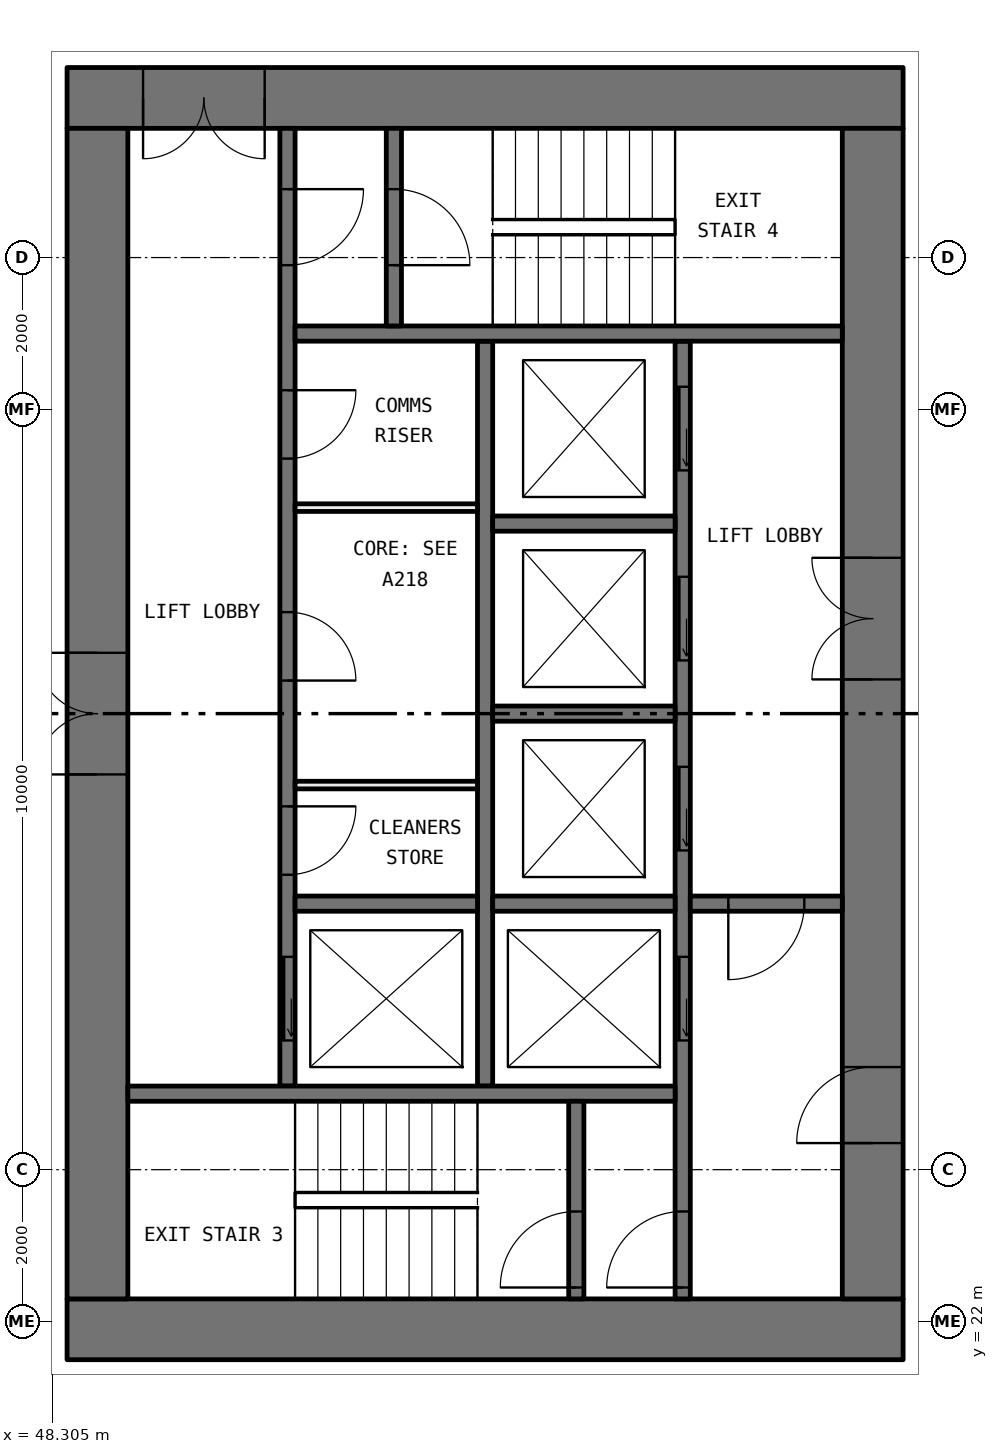
"""IFC4 building model, lengths in metres.
Left out: names, types, materials, properties, quantities, classifications, styles, units other than length and angle.
Written with IfcOpenShell. Run it as: python <this file> out.ifc"""

import sys

from ifc_helpers import new_model, si_unit, direction, frame, frame_2d, origin, place, context, subcontext, project, spatial, rectangle, extrude, element, fill, save


model = new_model("IFC4")
c1 = context("Model", 3, precision=1e-05, world=origin(), true_north=direction((0.0, 1.0)))
c2 = subcontext(c1, "Body", "Model", "MODEL_VIEW")
j1 = project(units=[si_unit("LENGTHUNIT", "METRE"), si_unit("PLANEANGLEUNIT", "RADIAN")], contexts=[c1])
p1 = place(None, origin())
s1 = spatial("IfcSite", under=j1, at=p1, CompositionType="ELEMENT")
p2 = place(p1, origin())
s2 = spatial("IfcBuilding", under=s1, at=p2, CompositionType="ELEMENT")
p3 = place(p2, frame((0.0, 0.0, 71.4)))
s3 = spatial("IfcBuildingStorey", under=s2, at=p3, CompositionType="ELEMENT", Elevation=71.4)
p4 = place(p3, frame((59.5, 21.9, 0.0), z_axis=(0.0, 0.0, 1.0), x_axis=(-1.0, 0.0, 0.0)))
e1 = element("IfcWall", 1, at=p4, inside=s3, PredefinedType="SHEAR", context=c2, shape_type="SweptSolid", body=[
    extrude(rectangle(XDim=11.0, YDim=0.8, at=frame_2d((5.5, 0.0))), origin(), (0.0, 0.0, 1.0), 3.05),
])
p5 = place(p3, frame((59.5, 38.1, 0.0), z_axis=(0.0, 0.0, 1.0), x_axis=(-1.0, 0.0, 0.0)))
e2 = element("IfcWall", 2, at=p5, inside=s3, PredefinedType="SHEAR", context=c2, shape_type="SweptSolid", body=[
    extrude(rectangle(XDim=11.0, YDim=0.8, at=frame_2d((5.5, 0.0))), origin(), (0.0, 0.0, 1.0), 3.05),
])
p6 = place(p5, frame((8.4, 0.0, 0.0)))
e3 = element("IfcOpeningElement", 3, at=p6, cuts=e2, PredefinedType="OPENING", context=c2, shape_type="SweptSolid", body=[
    extrude(rectangle(XDim=1.6, YDim=2.1, at=frame_2d((0.8, 1.05))), frame((0.0, 0.41, 0.0), z_axis=(0.0, -1.0, 0.0), x_axis=(1.0, 0.0, 0.0)), (0.0, 0.0, 1.0), 0.82),
])
p7 = place(p3, frame((59.1, 22.3, 0.0), z_axis=(0.0, 0.0, 1.0), x_axis=(0.0, 1.0, 0.0)))
e4 = element("IfcWall", 4, at=p7, inside=s3, PredefinedType="SHEAR", context=c2, shape_type="SweptSolid", body=[
    extrude(rectangle(XDim=15.4, YDim=0.8, at=frame_2d((7.7, 0.0))), origin(), (0.0, 0.0, 1.0), 3.05),
])
p8 = place(p7, frame((8.15, 0.0, 0.0)))
e5 = element("IfcOpeningElement", 5, at=p8, cuts=e4, PredefinedType="OPENING", context=c2, shape_type="SweptSolid", body=[
    extrude(rectangle(XDim=1.6, YDim=2.1, at=frame_2d((0.8, 1.05))), frame((0.0, 0.41, 0.0), z_axis=(0.0, -1.0, 0.0), x_axis=(1.0, 0.0, 0.0)), (0.0, 0.0, 1.0), 0.82),
])
p9 = place(p7, frame((2.05, 0.0, 0.0)))
e6 = element("IfcOpeningElement", 6, at=p9, cuts=e4, PredefinedType="OPENING", context=c2, shape_type="SweptSolid", body=[
    extrude(rectangle(XDim=1.0, YDim=2.1, at=frame_2d((0.5, 1.05))), frame((0.0, 0.41, 0.0), z_axis=(0.0, -1.0, 0.0), x_axis=(1.0, 0.0, 0.0)), (0.0, 0.0, 1.0), 0.82),
])
p10 = place(p3, frame((48.9, 22.3, 0.0), z_axis=(0.0, 0.0, 1.0), x_axis=(0.0, 1.0, 0.0)))
e7 = element("IfcWall", 7, at=p10, inside=s3, PredefinedType="SHEAR", context=c2, shape_type="SweptSolid", body=[
    extrude(rectangle(XDim=15.4, YDim=0.8, at=frame_2d((7.7, 0.0))), origin(), (0.0, 0.0, 1.0), 3.05),
])
p11 = place(p10, frame((6.9, 0.0, 0.0)))
e8 = element("IfcOpeningElement", 8, at=p11, cuts=e7, PredefinedType="OPENING", context=c2, shape_type="SweptSolid", body=[
    extrude(rectangle(XDim=1.6, YDim=2.1, at=frame_2d((0.8, 1.05))), frame((0.0, 0.41, 0.0), z_axis=(0.0, -1.0, 0.0), x_axis=(1.0, 0.0, 0.0)), (0.0, 0.0, 1.0), 0.82),
])
p12 = place(p3, frame((56.6, 22.3, 0.0), z_axis=(0.0, 0.0, 1.0), x_axis=(0.0, 1.0, 0.0)))
e9 = element("IfcWall", 9, at=p12, inside=s3, PredefinedType="SOLIDWALL", context=c2, shape_type="SweptSolid", body=[
    extrude(rectangle(XDim=12.6, YDim=0.2, at=frame_2d((6.3, 0.0))), origin(), (0.0, 0.0, 1.0), 3.05),
])
p13 = place(p12, frame((3.4, 0.0, 0.0)))
e10 = element("IfcOpeningElement", 10, at=p13, cuts=e9, PredefinedType="OPENING", context=c2, shape_type="SweptSolid", body=[
    extrude(rectangle(XDim=1.1, YDim=2.1, at=frame_2d((0.55, 1.05))), frame((0.0, 0.11, 0.0), z_axis=(0.0, -1.0, 0.0), x_axis=(1.0, 0.0, 0.0)), (0.0, 0.0, 1.0), 0.22),
])
p14 = place(p12, frame((5.9, 0.0, 0.0)))
e11 = element("IfcOpeningElement", 11, at=p14, cuts=e9, PredefinedType="OPENING", context=c2, shape_type="SweptSolid", body=[
    extrude(rectangle(XDim=1.1, YDim=2.1, at=frame_2d((0.55, 1.05))), frame((0.0, 0.11, 0.0), z_axis=(0.0, -1.0, 0.0), x_axis=(1.0, 0.0, 0.0)), (0.0, 0.0, 1.0), 0.22),
])
p15 = place(p12, frame((8.4, 0.0, 0.0)))
e12 = element("IfcOpeningElement", 12, at=p15, cuts=e9, PredefinedType="OPENING", context=c2, shape_type="SweptSolid", body=[
    extrude(rectangle(XDim=1.1, YDim=2.1, at=frame_2d((0.55, 1.05))), frame((0.0, 0.11, 0.0), z_axis=(0.0, -1.0, 0.0), x_axis=(1.0, 0.0, 0.0)), (0.0, 0.0, 1.0), 0.22),
])
p16 = place(p12, frame((10.9, 0.0, 0.0)))
e13 = element("IfcOpeningElement", 13, at=p16, cuts=e9, PredefinedType="OPENING", context=c2, shape_type="SweptSolid", body=[
    extrude(rectangle(XDim=1.1, YDim=2.1, at=frame_2d((0.55, 1.05))), frame((0.0, 0.11, 0.0), z_axis=(0.0, -1.0, 0.0), x_axis=(1.0, 0.0, 0.0)), (0.0, 0.0, 1.0), 0.22),
])
p17 = place(p12, frame((0.15, 0.0, 0.0)))
e14 = element("IfcOpeningElement", 14, at=p17, cuts=e9, PredefinedType="OPENING", context=c2, shape_type="SweptSolid", body=[
    extrude(rectangle(XDim=1.0, YDim=2.1, at=frame_2d((0.5, 1.05))), frame((0.0, 0.11, 0.0), z_axis=(0.0, -1.0, 0.0), x_axis=(1.0, 0.0, 0.0)), (0.0, 0.0, 1.0), 0.22),
])
p18 = place(p3, frame((51.4, 25.1, 0.0), z_axis=(0.0, 0.0, 1.0), x_axis=(0.0, 1.0, 0.0)))
e15 = element("IfcWall", 15, at=p18, inside=s3, PredefinedType="SOLIDWALL", context=c2, shape_type="SweptSolid", body=[
    extrude(rectangle(XDim=12.6, YDim=0.2, at=frame_2d((6.3, 0.0))), origin(), (0.0, 0.0, 1.0), 3.05),
])
p19 = place(p18, frame((0.6, 0.0, 0.0)))
e16 = element("IfcOpeningElement", 16, at=p19, cuts=e15, PredefinedType="OPENING", context=c2, shape_type="SweptSolid", body=[
    extrude(rectangle(XDim=1.1, YDim=2.1, at=frame_2d((0.55, 1.05))), frame((0.0, 0.11, 0.0), z_axis=(0.0, -1.0, 0.0), x_axis=(1.0, 0.0, 0.0)), (0.0, 0.0, 1.0), 0.22),
])
p20 = place(p18, frame((10.8, 0.0, 0.0)))
e17 = element("IfcOpeningElement", 17, at=p20, cuts=e15, PredefinedType="OPENING", context=c2, shape_type="SweptSolid", body=[
    extrude(rectangle(XDim=1.0, YDim=2.1, at=frame_2d((0.5, 1.05))), frame((0.0, 0.11, 0.0), z_axis=(0.0, -1.0, 0.0), x_axis=(1.0, 0.0, 0.0)), (0.0, 0.0, 1.0), 0.22),
])
p21 = place(p18, frame((2.78, 0.0, 0.0)))
e18 = element("IfcOpeningElement", 18, at=p21, cuts=e15, PredefinedType="OPENING", context=c2, shape_type="SweptSolid", body=[
    extrude(rectangle(XDim=0.9, YDim=2.1, at=frame_2d((0.45, 1.05))), frame((0.0, 0.11, 0.0), z_axis=(0.0, -1.0, 0.0), x_axis=(1.0, 0.0, 0.0)), (0.0, 0.0, 1.0), 0.22),
])
p22 = place(p18, frame((5.335, 0.0, 0.0)))
e19 = element("IfcOpeningElement", 19, at=p22, cuts=e15, PredefinedType="OPENING", context=c2, shape_type="SweptSolid", body=[
    extrude(rectangle(XDim=0.9, YDim=2.1, at=frame_2d((0.45, 1.05))), frame((0.0, 0.11, 0.0), z_axis=(0.0, -1.0, 0.0), x_axis=(1.0, 0.0, 0.0)), (0.0, 0.0, 1.0), 0.22),
])
p23 = place(p18, frame((8.255, 0.0, 0.0)))
e20 = element("IfcOpeningElement", 20, at=p23, cuts=e15, PredefinedType="OPENING", context=c2, shape_type="SweptSolid", body=[
    extrude(rectangle(XDim=0.9, YDim=2.1, at=frame_2d((0.45, 1.05))), frame((0.0, 0.11, 0.0), z_axis=(0.0, -1.0, 0.0), x_axis=(1.0, 0.0, 0.0)), (0.0, 0.0, 1.0), 0.22),
])
p24 = place(p3, frame((54.0, 25.1, 0.0), z_axis=(0.0, 0.0, 1.0), x_axis=(0.0, 1.0, 0.0)))
e21 = element("IfcWall", 21, at=p24, inside=s3, PredefinedType="SOLIDWALL", context=c2, shape_type="SweptSolid", body=[
    extrude(rectangle(XDim=9.8, YDim=0.2, at=frame_2d((4.9, 0.0))), origin(), (0.0, 0.0, 1.0), 3.05),
])
for number, where, z_axis, x_axis in (
    (22, (56.5, 25.0, 0.0), (0.0, 0.0, 1.0), (-1.0, 0.0, 0.0)),
    (23, (58.7, 35.0, 0.0), (0.0, 0.0, 1.0), (-1.0, 0.0, 0.0)),
):
    element("IfcWall", number, at=place(p3, frame(where, z_axis=z_axis, x_axis=x_axis)), inside=s3, PredefinedType="SOLIDWALL", context=c2, shape_type="SweptSolid", body=[
        extrude(rectangle(XDim=7.2, YDim=0.2, at=frame_2d((3.6, 0.0))), origin(), (0.0, 0.0, 1.0), 3.05),
    ])
p25 = place(p3, frame((58.7, 27.5, 0.0), z_axis=(0.0, 0.0, 1.0), x_axis=(-1.0, 0.0, 0.0)))
e24 = element("IfcWall", 24, at=p25, inside=s3, PredefinedType="SOLIDWALL", context=c2, shape_type="SweptSolid", body=[
    extrude(rectangle(XDim=2.0, YDim=0.2, at=frame_2d((1.0, 0.0))), origin(), (0.0, 0.0, 1.0), 3.05),
])
p26 = place(p25, frame((0.5, 0.0, 0.0)))
e25 = element("IfcOpeningElement", 25, at=p26, cuts=e24, PredefinedType="OPENING", context=c2, shape_type="SweptSolid", body=[
    extrude(rectangle(XDim=1.0, YDim=2.1, at=frame_2d((0.5, 1.05))), frame((0.0, 0.11, 0.0), z_axis=(0.0, -1.0, 0.0), x_axis=(1.0, 0.0, 0.0)), (0.0, 0.0, 1.0), 0.22),
])
p27 = place(p3, frame((55.2, 22.3, 0.0), z_axis=(0.0, 0.0, 1.0), x_axis=(0.0, 1.0, 0.0)))
e26 = element("IfcWall", 26, at=p27, inside=s3, PredefinedType="SOLIDWALL", context=c2, shape_type="SweptSolid", body=[
    extrude(rectangle(XDim=2.6, YDim=0.2, at=frame_2d((1.3, 0.0))), origin(), (0.0, 0.0, 1.0), 3.05),
])
p28 = place(p27, frame((0.15, 0.0, 0.0)))
e27 = element("IfcOpeningElement", 27, at=p28, cuts=e26, PredefinedType="OPENING", context=c2, shape_type="SweptSolid", body=[
    extrude(rectangle(XDim=1.0, YDim=2.1, at=frame_2d((0.5, 1.05))), frame((0.0, 0.11, 0.0), z_axis=(0.0, -1.0, 0.0), x_axis=(1.0, 0.0, 0.0)), (0.0, 0.0, 1.0), 0.22),
])
p29 = place(p3, frame((52.8, 35.1, 0.0), z_axis=(0.0, 0.0, 1.0), x_axis=(0.0, 1.0, 0.0)))
e28 = element("IfcWall", 28, at=p29, inside=s3, PredefinedType="SOLIDWALL", context=c2, shape_type="SweptSolid", body=[
    extrude(rectangle(XDim=2.6, YDim=0.2, at=frame_2d((1.3, 0.0))), origin(), (0.0, 0.0, 1.0), 3.05),
])
p30 = place(p29, frame((0.8, 0.0, 0.0)))
e29 = element("IfcOpeningElement", 29, at=p30, cuts=e28, PredefinedType="OPENING", context=c2, shape_type="SweptSolid", body=[
    extrude(rectangle(XDim=1.0, YDim=2.1, at=frame_2d((0.5, 1.05))), frame((0.0, 0.11, 0.0), z_axis=(0.0, -1.0, 0.0), x_axis=(1.0, 0.0, 0.0)), (0.0, 0.0, 1.0), 0.22),
])
for number, where, z_axis, x_axis in (
    (30, (56.5, 27.5, 0.0), (0.0, 0.0, 1.0), (-1.0, 0.0, 0.0)),
    (31, (56.5, 30.0, 0.0), (0.0, 0.0, 1.0), (-1.0, 0.0, 0.0)),
    (32, (56.5, 32.5, 0.0), (0.0, 0.0, 1.0), (-1.0, 0.0, 0.0)),
    (33, (53.9, 27.5, 0.0), (0.0, 0.0, 1.0), (-1.0, 0.0, 0.0)),
):
    element("IfcWall", number, at=place(p3, frame(where, z_axis=z_axis, x_axis=x_axis)), inside=s3, PredefinedType="SOLIDWALL", context=c2, shape_type="SweptSolid", body=[
        extrude(rectangle(XDim=2.4, YDim=0.2, at=frame_2d((1.2, 0.0))), origin(), (0.0, 0.0, 1.0), 3.05),
    ])
for number, where, z_axis, x_axis in (
    (34, (53.9, 29.06, 0.0), (0.0, 0.0, 1.0), (-1.0, 0.0, 0.0)),
    (35, (53.9, 32.71, 0.0), (0.0, 0.0, 1.0), (-1.0, 0.0, 0.0)),
):
    element("IfcWall", number, at=place(p3, frame(where, z_axis=z_axis, x_axis=x_axis)), inside=s3, PredefinedType="PARTITIONING", context=c2, shape_type="SweptSolid", body=[
        extrude(rectangle(XDim=2.4, YDim=0.1, at=frame_2d((1.2, 0.0))), origin(), (0.0, 0.0, 1.0), 3.05),
    ])
p31 = place(p19, origin())
e36 = element("IfcDoor", 36, at=p31, inside=s3, OperationType="SLIDING_TO_LEFT", PredefinedType="DOOR", context=c2, shape_type="SweptSolid", body=[
    extrude(rectangle(XDim=1.1, YDim=2.1, at=frame_2d((0.55, 1.05))), frame((0.0, 0.025, 0.0), z_axis=(0.0, -1.0, 0.0), x_axis=(1.0, 0.0, 0.0)), (0.0, 0.0, 1.0), 0.05),
])
fill(e16, e36)
p32 = place(p13, origin())
e37 = element("IfcDoor", 37, at=p32, inside=s3, OperationType="SLIDING_TO_LEFT", PredefinedType="DOOR", context=c2, shape_type="SweptSolid", body=[
    extrude(rectangle(XDim=1.1, YDim=2.1, at=frame_2d((0.55, 1.05))), frame((0.0, 0.025, 0.0), z_axis=(0.0, -1.0, 0.0), x_axis=(1.0, 0.0, 0.0)), (0.0, 0.0, 1.0), 0.05),
])
fill(e10, e37)
p33 = place(p14, origin())
e38 = element("IfcDoor", 38, at=p33, inside=s3, OperationType="SLIDING_TO_LEFT", PredefinedType="DOOR", context=c2, shape_type="SweptSolid", body=[
    extrude(rectangle(XDim=1.1, YDim=2.1, at=frame_2d((0.55, 1.05))), frame((0.0, 0.025, 0.0), z_axis=(0.0, -1.0, 0.0), x_axis=(1.0, 0.0, 0.0)), (0.0, 0.0, 1.0), 0.05),
])
fill(e11, e38)
p34 = place(p15, origin())
e39 = element("IfcDoor", 39, at=p34, inside=s3, OperationType="SLIDING_TO_LEFT", PredefinedType="DOOR", context=c2, shape_type="SweptSolid", body=[
    extrude(rectangle(XDim=1.1, YDim=2.1, at=frame_2d((0.55, 1.05))), frame((0.0, 0.025, 0.0), z_axis=(0.0, -1.0, 0.0), x_axis=(1.0, 0.0, 0.0)), (0.0, 0.0, 1.0), 0.05),
])
fill(e12, e39)
p35 = place(p16, origin())
e40 = element("IfcDoor", 40, at=p35, inside=s3, OperationType="SLIDING_TO_LEFT", PredefinedType="DOOR", context=c2, shape_type="SweptSolid", body=[
    extrude(rectangle(XDim=1.1, YDim=2.1, at=frame_2d((0.55, 1.05))), frame((0.0, 0.025, 0.0), z_axis=(0.0, -1.0, 0.0), x_axis=(1.0, 0.0, 0.0)), (0.0, 0.0, 1.0), 0.05),
])
fill(e13, e40)
p36 = place(p28, origin())
e41 = element("IfcDoor", 41, at=p36, inside=s3, OperationType="SINGLE_SWING_RIGHT", PredefinedType="DOOR", context=c2, shape_type="SweptSolid", body=[
    extrude(rectangle(XDim=1.0, YDim=2.1, at=frame_2d((0.5, 1.05))), frame((0.0, 0.025, 0.0), z_axis=(0.0, -1.0, 0.0), x_axis=(1.0, 0.0, 0.0)), (0.0, 0.0, 1.0), 0.05),
])
fill(e27, e41)
p37 = place(p17, origin())
e42 = element("IfcDoor", 42, at=p37, inside=s3, OperationType="SINGLE_SWING_RIGHT", PredefinedType="DOOR", context=c2, shape_type="SweptSolid", body=[
    extrude(rectangle(XDim=1.0, YDim=2.1, at=frame_2d((0.5, 1.05))), frame((0.0, 0.025, 0.0), z_axis=(0.0, -1.0, 0.0), x_axis=(1.0, 0.0, 0.0)), (0.0, 0.0, 1.0), 0.05),
])
fill(e14, e42)
p38 = place(p20, frame((1.0, 0.0, 0.0), x_axis=(-1.0, 0.0, 0.0)))
e43 = element("IfcDoor", 43, at=p38, inside=s3, OperationType="SINGLE_SWING_RIGHT", PredefinedType="DOOR", context=c2, shape_type="SweptSolid", body=[
    extrude(rectangle(XDim=1.0, YDim=2.1, at=frame_2d((0.5, 1.05))), frame((0.0, 0.025, 0.0), z_axis=(0.0, -1.0, 0.0), x_axis=(1.0, 0.0, 0.0)), (0.0, 0.0, 1.0), 0.05),
])
fill(e17, e43)
p39 = place(p30, frame((1.0, 0.0, 0.0), x_axis=(-1.0, 0.0, 0.0)))
e44 = element("IfcDoor", 44, at=p39, inside=s3, OperationType="SINGLE_SWING_LEFT", PredefinedType="DOOR", context=c2, shape_type="SweptSolid", body=[
    extrude(rectangle(XDim=1.0, YDim=2.1, at=frame_2d((0.5, 1.05))), frame((0.0, 0.025, 0.0), z_axis=(0.0, -1.0, 0.0), x_axis=(1.0, 0.0, 0.0)), (0.0, 0.0, 1.0), 0.05),
])
fill(e29, e44)
p40 = place(p26, origin())
e45 = element("IfcDoor", 45, at=p40, inside=s3, OperationType="SINGLE_SWING_LEFT", PredefinedType="DOOR", context=c2, shape_type="SweptSolid", body=[
    extrude(rectangle(XDim=1.0, YDim=2.1, at=frame_2d((0.5, 1.05))), frame((0.0, 0.025, 0.0), z_axis=(0.0, -1.0, 0.0), x_axis=(1.0, 0.0, 0.0)), (0.0, 0.0, 1.0), 0.05),
])
fill(e25, e45)
p41 = place(p8, origin())
e46 = element("IfcDoor", 46, at=p41, inside=s3, OperationType="DOUBLE_DOOR_SINGLE_SWING", PredefinedType="DOOR", context=c2, shape_type="SweptSolid", body=[
    extrude(rectangle(XDim=1.6, YDim=2.1, at=frame_2d((0.8, 1.05))), frame((0.0, 0.025, 0.0), z_axis=(0.0, -1.0, 0.0), x_axis=(1.0, 0.0, 0.0)), (0.0, 0.0, 1.0), 0.05),
])
fill(e5, e46)
p42 = place(p9, origin())
e47 = element("IfcDoor", 47, at=p42, inside=s3, OperationType="SINGLE_SWING_RIGHT", PredefinedType="DOOR", context=c2, shape_type="SweptSolid", body=[
    extrude(rectangle(XDim=1.0, YDim=2.1, at=frame_2d((0.5, 1.05))), frame((0.0, 0.025, 0.0), z_axis=(0.0, -1.0, 0.0), x_axis=(1.0, 0.0, 0.0)), (0.0, 0.0, 1.0), 0.05),
])
fill(e6, e47)
p43 = place(p6, origin())
e48 = element("IfcDoor", 48, at=p43, inside=s3, OperationType="DOUBLE_DOOR_SINGLE_SWING", PredefinedType="DOOR", context=c2, shape_type="SweptSolid", body=[
    extrude(rectangle(XDim=1.6, YDim=2.1, at=frame_2d((0.8, 1.05))), frame((0.0, 0.025, 0.0), z_axis=(0.0, -1.0, 0.0), x_axis=(1.0, 0.0, 0.0)), (0.0, 0.0, 1.0), 0.05),
])
fill(e3, e48)
p44 = place(p11, origin())
e49 = element("IfcDoor", 49, at=p44, inside=s3, OperationType="DOUBLE_DOOR_SINGLE_SWING", PredefinedType="DOOR", context=c2, shape_type="SweptSolid", body=[
    extrude(rectangle(XDim=1.6, YDim=2.1, at=frame_2d((0.8, 1.05))), frame((0.0, 0.025, 0.0), z_axis=(0.0, -1.0, 0.0), x_axis=(1.0, 0.0, 0.0)), (0.0, 0.0, 1.0), 0.05),
])
fill(e8, e49)
p45 = place(p21, frame((0.9, 0.0, 0.0), x_axis=(-1.0, 0.0, 0.0)))
e50 = element("IfcDoor", 50, at=p45, inside=s3, OperationType="SINGLE_SWING_RIGHT", PredefinedType="DOOR", context=c2, shape_type="SweptSolid", body=[
    extrude(rectangle(XDim=0.9, YDim=2.1, at=frame_2d((0.45, 1.05))), frame((0.0, 0.025, 0.0), z_axis=(0.0, -1.0, 0.0), x_axis=(1.0, 0.0, 0.0)), (0.0, 0.0, 1.0), 0.05),
])
fill(e18, e50)
p46 = place(p22, frame((0.9, 0.0, 0.0), x_axis=(-1.0, 0.0, 0.0)))
e51 = element("IfcDoor", 51, at=p46, inside=s3, OperationType="SINGLE_SWING_LEFT", PredefinedType="DOOR", context=c2, shape_type="SweptSolid", body=[
    extrude(rectangle(XDim=0.9, YDim=2.1, at=frame_2d((0.45, 1.05))), frame((0.0, 0.025, 0.0), z_axis=(0.0, -1.0, 0.0), x_axis=(1.0, 0.0, 0.0)), (0.0, 0.0, 1.0), 0.05),
])
fill(e19, e51)
p47 = place(p23, frame((0.9, 0.0, 0.0), x_axis=(-1.0, 0.0, 0.0)))
e52 = element("IfcDoor", 52, at=p47, inside=s3, OperationType="SINGLE_SWING_RIGHT", PredefinedType="DOOR", context=c2, shape_type="SweptSolid", body=[
    extrude(rectangle(XDim=0.9, YDim=2.1, at=frame_2d((0.45, 1.05))), frame((0.0, 0.025, 0.0), z_axis=(0.0, -1.0, 0.0), x_axis=(1.0, 0.0, 0.0)), (0.0, 0.0, 1.0), 0.05),
])
fill(e20, e52)
save(model, sys.argv[1])
